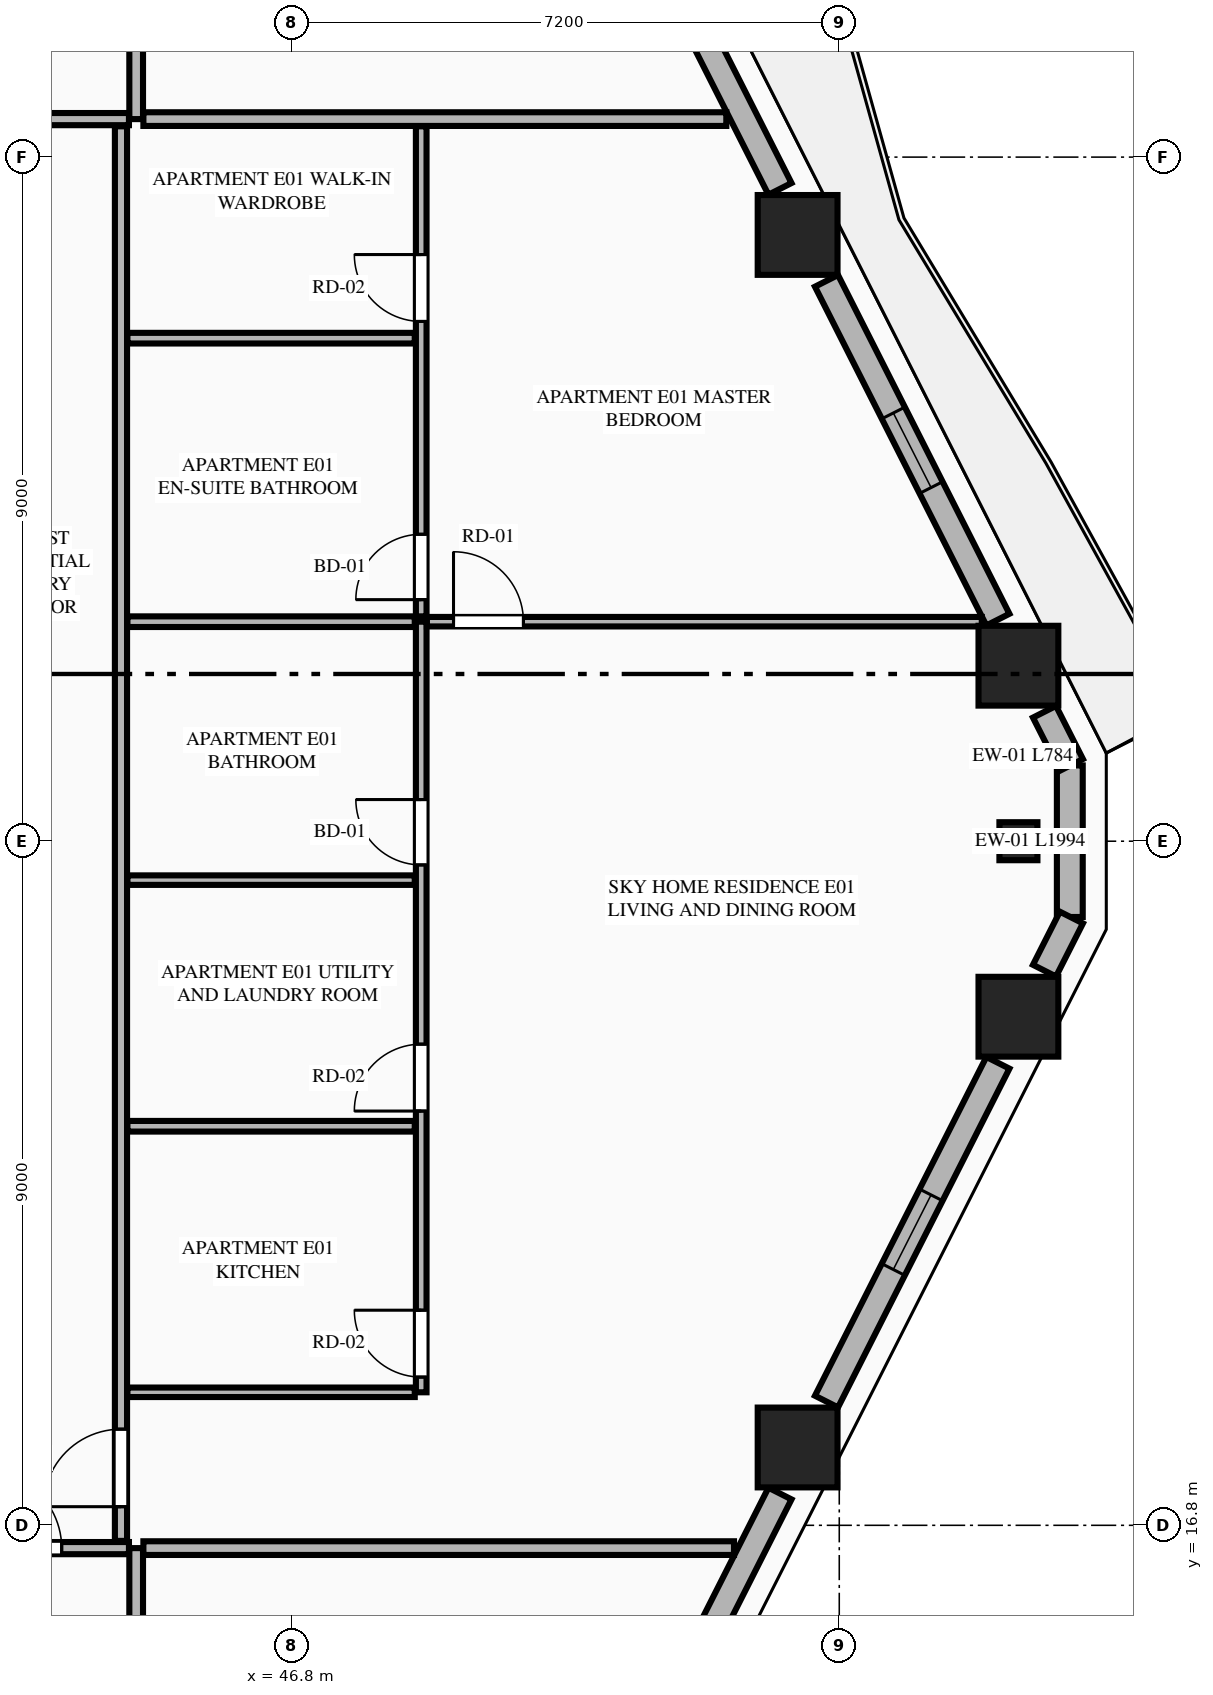
"""IFC4 building model, lengths in metres.
Left out: names, types, materials, properties, quantities, classifications, styles, units other than length and angle.
Written with IfcOpenShell. Run it as: python <this file> out.ifc"""

import sys

from ifc_helpers import new_model, si_unit, direction, frame, frame_2d, origin, origin_2d, place, context, subcontext, project, spatial, rectangle, extrude, element, fill, save


model = new_model("IFC4")
c1 = context("Model", 3, precision=1e-05, world=origin(), true_north=direction((0.0, 1.0)))
c2 = subcontext(c1, "Body", "Model", "MODEL_VIEW")
j1 = project(units=[si_unit("LENGTHUNIT", "METRE"), si_unit("PLANEANGLEUNIT", "RADIAN")], contexts=[c1])
p1 = place(None, origin())
s1 = spatial("IfcSite", under=j1, at=p1, CompositionType="ELEMENT")
p2 = place(p1, origin())
s2 = spatial("IfcBuilding", under=s1, at=p2, CompositionType="ELEMENT")
p3 = place(p2, frame((0.0, 0.0, 130.35)))
s3 = spatial("IfcBuildingStorey", under=s2, at=p3, CompositionType="ELEMENT", Elevation=130.35)
for number, where, z_axis, x_axis in (
    (1, (53.452, 17.824, 0.0), (0.0, 0.0, 1.0), (1.0, 0.0, 0.0)),
    (2, (56.357, 23.491, 0.0), (0.0, 0.0, 1.0), (1.0, 0.0, 0.0)),
    (3, (56.357, 28.109, 0.0), (0.0, 0.0, 1.0), (1.0, 0.0, 0.0)),
    (4, (53.452, 33.776, 0.0), (0.0, 0.0, 1.0), (1.0, 0.0, 0.0)),
):
    element("IfcColumn", number, at=place(p3, frame(where, z_axis=z_axis, x_axis=x_axis)), inside=s3, PredefinedType="COLUMN", context=c2, shape_type="SweptSolid", body=[
        extrude(rectangle(XDim=1.05, YDim=1.05, at=origin_2d()), origin(), (0.0, 0.0, 1.0), 3.55),
    ])
p4 = place(p3, frame((56.357, 25.8, 0.0), z_axis=(0.0, 0.0, 1.0), x_axis=(0.0, 1.0, 0.0)))
e5 = element("IfcColumn", 5, at=p4, inside=s3, PredefinedType="PILASTER", context=c2, shape_type="SweptSolid", body=[
    extrude(rectangle(XDim=0.5, YDim=0.35, at=origin_2d()), origin(), (0.0, 0.0, 1.0), 3.55),
])
p5 = place(p3, frame((57.033, 24.803, 0.0), z_axis=(0.0, 0.0, 1.0), x_axis=(0.0, 1.0, 0.0)))
e6 = element("IfcWall", 6, at=p5, inside=s3, PredefinedType="STANDARD", context=c2, shape_type="SweptSolid", body=[
    extrude(rectangle(XDim=1.994, YDim=0.34, at=frame_2d((0.997, 0.0))), origin(), (0.0, 0.0, 1.0), 3.34),
])
p6 = place(p3, frame((50.863, 12.561, 0.0), z_axis=(0.0, 0.0, 1.0), x_axis=(0.451567731634, 0.892236842855, 0.0)))
e7 = element("IfcWall", 7, at=p6, inside=s3, PredefinedType="STANDARD", context=c2, shape_type="SweptSolid", body=[
    extrude(rectangle(XDim=5.219, YDim=0.34, at=frame_2d((2.61, 0.0))), origin(), (0.0, 0.0, 1.0), 2.797),
])
p7 = place(p6, frame((2.06, 0.0, 0.75)))
e8 = element("IfcOpeningElement", 8, at=p7, cuts=e7, PredefinedType="OPENING", context=c2, shape_type="SweptSolid", body=[
    extrude(rectangle(XDim=1.1, YDim=1.897, at=frame_2d((0.55, 0.948))), frame((0.0, 0.18, 0.0), z_axis=(0.0, -1.0, 0.0), x_axis=(1.0, 0.0, 0.0)), (0.0, 0.0, 1.0), 0.36),
])
p8 = place(p3, frame((53.832, 18.428, 0.0), z_axis=(0.0, 0.0, 1.0), x_axis=(0.451431617681, 0.892305718102, 0.0)))
e9 = element("IfcWall", 9, at=p8, inside=s3, PredefinedType="STANDARD", context=c2, shape_type="SweptSolid", body=[
    extrude(rectangle(XDim=4.995, YDim=0.34, at=frame_2d((2.498, 0.0))), origin(), (0.0, 0.0, 1.0), 2.797),
])
p9 = place(p8, frame((1.947, 0.0, 0.75)))
e10 = element("IfcOpeningElement", 10, at=p9, cuts=e9, PredefinedType="OPENING", context=c2, shape_type="SweptSolid", body=[
    extrude(rectangle(XDim=1.1, YDim=1.897, at=frame_2d((0.55, 0.948))), frame((0.0, 0.18, 0.0), z_axis=(0.0, -1.0, 0.0), x_axis=(1.0, 0.0, 0.0)), (0.0, 0.0, 1.0), 0.36),
])
for number, where, z_axis, x_axis in (
    (11, (56.7, 24.097, 0.0), (0.0, 0.0, 1.0), (0.452, 0.892, 0.0)),
    (12, (57.054, 26.804, 0.0), (0.0, 0.0, 1.0), (-0.452, 0.892, 0.0)),
):
    element("IfcWall", number, at=place(p3, frame(where, z_axis=z_axis, x_axis=x_axis)), inside=s3, PredefinedType="STANDARD", context=c2, shape_type="SweptSolid", body=[
        extrude(rectangle(XDim=0.783, YDim=0.34, at=frame_2d((0.392, 0.0))), origin(), (0.0, 0.0, 1.0), 3.34),
    ])
p10 = place(p3, frame((56.087, 28.715, 0.0), z_axis=(0.0, 0.0, 1.0), x_axis=(-0.451431617681, 0.892305718102, 0.0)))
e13 = element("IfcWall", 13, at=p10, inside=s3, PredefinedType="STANDARD", context=c2, shape_type="SweptSolid", body=[
    extrude(rectangle(XDim=4.995, YDim=0.34, at=frame_2d((2.498, 0.0))), origin(), (0.0, 0.0, 1.0), 2.797),
])
p11 = place(p10, frame((1.947, 0.0, 0.75)))
e14 = element("IfcOpeningElement", 14, at=p11, cuts=e13, PredefinedType="OPENING", context=c2, shape_type="SweptSolid", body=[
    extrude(rectangle(XDim=1.1, YDim=1.897, at=frame_2d((0.55, 0.948))), frame((0.0, 0.18, 0.0), z_axis=(0.0, -1.0, 0.0), x_axis=(1.0, 0.0, 0.0)), (0.0, 0.0, 1.0), 0.36),
])
p12 = place(p3, frame((53.22, 34.382, 0.0), z_axis=(0.0, 0.0, 1.0), x_axis=(-0.451567731634, 0.892236842855, 0.0)))
e15 = element("IfcWall", 15, at=p12, inside=s3, PredefinedType="STANDARD", context=c2, shape_type="SweptSolid", body=[
    extrude(rectangle(XDim=5.219, YDim=0.34, at=frame_2d((2.61, 0.0))), origin(), (0.0, 0.0, 1.0), 2.797),
])
p13 = place(p12, frame((2.699, 0.0, 0.0)))
e16 = element("IfcOpeningElement", 16, at=p13, cuts=e15, PredefinedType="OPENING", context=c2, shape_type="SweptSolid", body=[
    extrude(rectangle(XDim=1.1, YDim=2.25, at=frame_2d((0.55, 1.125))), frame((0.0, 0.18, 0.0), z_axis=(0.0, -1.0, 0.0), x_axis=(1.0, 0.0, 0.0)), (0.0, 0.0, 1.0), 0.36),
])
p14 = place(p3, frame((44.75, 4.105, 0.0), z_axis=(0.0, 0.0, 1.0), x_axis=(0.0, 1.0, 0.0)))
e17 = element("IfcWall", 17, at=p14, inside=s3, PredefinedType="PARTITIONING", context=c2, shape_type="SweptSolid", body=[
    extrude(rectangle(XDim=12.395, YDim=0.18, at=frame_2d((6.198, 0.0))), origin(), (0.0, 0.0, 1.0), 3.34),
])
p15 = place(p3, frame((28.663, 16.5, 0.0), z_axis=(0.0, 0.0, 1.0), x_axis=(1.0, 0.0, 0.0)))
e18 = element("IfcWall", 18, at=p15, inside=s3, PredefinedType="PARTITIONING", context=c2, shape_type="SweptSolid", body=[
    extrude(rectangle(XDim=15.992, YDim=0.16, at=frame_2d((7.996, 0.0))), origin(), (0.0, 0.0, 1.0), 3.34),
])
p16 = place(p15, frame((14.087, 0.0, 0.0)))
e19 = element("IfcOpeningElement", 19, at=p16, cuts=e18, PredefinedType="OPENING", context=c2, shape_type="SweptSolid", body=[
    extrude(rectangle(XDim=1.02, YDim=2.25, at=frame_2d((0.51, 1.125))), frame((0.0, 0.09, 0.0), z_axis=(0.0, -1.0, 0.0), x_axis=(1.0, 0.0, 0.0)), (0.0, 0.0, 1.0), 0.18),
])
p17 = place(p3, frame((44.75, 35.3, 0.0), z_axis=(0.0, 0.0, 1.0), x_axis=(0.0, 1.0, 0.0)))
e20 = element("IfcWall", 20, at=p17, inside=s3, PredefinedType="PARTITIONING", context=c2, shape_type="SweptSolid", body=[
    extrude(rectangle(XDim=12.195, YDim=0.18, at=frame_2d((6.098, 0.0))), origin(), (0.0, 0.0, 1.0), 3.34),
])
p18 = place(p3, frame((20.145, 35.3, 0.0), z_axis=(0.0, 0.0, 1.0), x_axis=(1.0, 0.0, 0.0)))
e21 = element("IfcWall", 21, at=p18, inside=s3, PredefinedType="PARTITIONING", context=c2, shape_type="SweptSolid", body=[
    extrude(rectangle(XDim=24.51, YDim=0.16, at=frame_2d((12.255, 0.0))), origin(), (0.0, 0.0, 1.0), 3.34),
])
p19 = place(p18, frame((0.405, 0.0, 0.0)))
e22 = element("IfcOpeningElement", 22, at=p19, cuts=e21, PredefinedType="OPENING", context=c2, shape_type="SweptSolid", body=[
    extrude(rectangle(XDim=1.35, YDim=2.35, at=frame_2d((0.675, 1.175))), frame((0.0, 0.09, 0.0), z_axis=(0.0, -1.0, 0.0), x_axis=(1.0, 0.0, 0.0)), (0.0, 0.0, 1.0), 0.18),
])
p20 = place(p3, frame((44.845, 16.5, 0.0), z_axis=(0.0, 0.0, 1.0), x_axis=(1.0, 0.0, 0.0)))
e23 = element("IfcWall", 23, at=p20, inside=s3, PredefinedType="PARTITIONING", context=c2, shape_type="SweptSolid", body=[
    extrude(rectangle(XDim=7.77, YDim=0.18, at=frame_2d((3.885, 0.0))), origin(), (0.0, 0.0, 1.0), 3.34),
])
p21 = place(p3, frame((44.845, 35.3, 0.0), z_axis=(0.0, 0.0, 1.0), x_axis=(1.0, 0.0, 0.0)))
e24 = element("IfcWall", 24, at=p21, inside=s3, PredefinedType="PARTITIONING", context=c2, shape_type="SweptSolid", body=[
    extrude(rectangle(XDim=7.669, YDim=0.18, at=frame_2d((3.834, 0.0))), origin(), (0.0, 0.0, 1.0), 3.34),
])
p22 = place(p3, frame((44.55, 16.595, 0.0), z_axis=(0.0, 0.0, 1.0), x_axis=(0.0, 1.0, 0.0)))
e25 = element("IfcWall", 25, at=p22, inside=s3, PredefinedType="PARTITIONING", context=c2, shape_type="SweptSolid", body=[
    extrude(rectangle(XDim=18.61, YDim=0.16, at=frame_2d((9.305, 0.0))), origin(), (0.0, 0.0, 1.0), 3.34),
])
p23 = place(p22, frame((0.45, 0.0, 0.0)))
e26 = element("IfcOpeningElement", 26, at=p23, cuts=e25, PredefinedType="OPENING", context=c2, shape_type="SweptSolid", body=[
    extrude(rectangle(XDim=1.02, YDim=2.25, at=frame_2d((0.51, 1.125))), frame((0.0, 0.09, 0.0), z_axis=(0.0, -1.0, 0.0), x_axis=(1.0, 0.0, 0.0)), (0.0, 0.0, 1.0), 0.18),
])
p24 = place(p3, frame((44.635, 18.55, 0.0), z_axis=(0.0, 0.0, 1.0), x_axis=(1.0, 0.0, 0.0)))
e27 = element("IfcWall", 27, at=p24, inside=s3, PredefinedType="PARTITIONING", context=c2, shape_type="SweptSolid", body=[
    extrude(rectangle(XDim=3.78, YDim=0.125, at=frame_2d((1.89, 0.0))), origin(), (0.0, 0.0, 1.0), 2.722),
])
p25 = place(p3, frame((48.5, 18.55, 0.0), z_axis=(0.0, 0.0, 1.0), x_axis=(0.0, 1.0, 0.0)))
e28 = element("IfcWall", 28, at=p25, inside=s3, PredefinedType="PLUMBINGWALL", context=c2, shape_type="SweptSolid", body=[
    extrude(rectangle(XDim=10.138, YDim=0.14, at=frame_2d((5.069, 0.0))), origin(), (0.0, 0.0, 1.0), 3.34),
])
p26 = place(p25, frame((0.2, 0.0, 0.0)))
e29 = element("IfcOpeningElement", 29, at=p26, cuts=e28, PredefinedType="OPENING", context=c2, shape_type="SweptSolid", body=[
    extrude(rectangle(XDim=0.88, YDim=2.15, at=frame_2d((0.44, 1.075))), frame((0.0, 0.08, 0.0), z_axis=(0.0, -1.0, 0.0), x_axis=(1.0, 0.0, 0.0)), (0.0, 0.0, 1.0), 0.16),
])
p27 = place(p25, frame((3.7, 0.0, 0.0)))
e30 = element("IfcOpeningElement", 30, at=p27, cuts=e28, PredefinedType="OPENING", context=c2, shape_type="SweptSolid", body=[
    extrude(rectangle(XDim=0.88, YDim=2.15, at=frame_2d((0.44, 1.075))), frame((0.0, 0.08, 0.0), z_axis=(0.0, -1.0, 0.0), x_axis=(1.0, 0.0, 0.0)), (0.0, 0.0, 1.0), 0.16),
])
p28 = place(p25, frame((6.938, 0.0, 0.0)))
e31 = element("IfcOpeningElement", 31, at=p28, cuts=e28, PredefinedType="OPENING", context=c2, shape_type="SweptSolid", body=[
    extrude(rectangle(XDim=0.86, YDim=2.1, at=frame_2d((0.43, 1.05))), frame((0.0, 0.08, 0.0), z_axis=(0.0, -1.0, 0.0), x_axis=(1.0, 0.0, 0.0)), (0.0, 0.0, 1.0), 0.16),
])
p29 = place(p3, frame((48.5, 28.758, 0.0), z_axis=(0.0, 0.0, 1.0), x_axis=(0.0, 1.0, 0.0)))
e32 = element("IfcWall", 32, at=p29, inside=s3, PredefinedType="PLUMBINGWALL", context=c2, shape_type="SweptSolid", body=[
    extrude(rectangle(XDim=6.447, YDim=0.14, at=frame_2d((3.224, 0.0))), origin(), (0.0, 0.0, 1.0), 3.34),
])
p30 = place(p29, frame((0.22, 0.0, 0.0)))
e33 = element("IfcOpeningElement", 33, at=p30, cuts=e32, PredefinedType="OPENING", context=c2, shape_type="SweptSolid", body=[
    extrude(rectangle(XDim=0.86, YDim=2.1, at=frame_2d((0.43, 1.05))), frame((0.0, 0.08, 0.0), z_axis=(0.0, -1.0, 0.0), x_axis=(1.0, 0.0, 0.0)), (0.0, 0.0, 1.0), 0.16),
])
p31 = place(p29, frame((3.88, 0.0, 0.0)))
e34 = element("IfcOpeningElement", 34, at=p31, cuts=e32, PredefinedType="OPENING", context=c2, shape_type="SweptSolid", body=[
    extrude(rectangle(XDim=0.88, YDim=2.15, at=frame_2d((0.44, 1.075))), frame((0.0, 0.08, 0.0), z_axis=(0.0, -1.0, 0.0), x_axis=(1.0, 0.0, 0.0)), (0.0, 0.0, 1.0), 0.16),
])
p32 = place(p3, frame((44.635, 28.688, 0.0), z_axis=(0.0, 0.0, 1.0), x_axis=(1.0, 0.0, 0.0)))
e35 = element("IfcWall", 35, at=p32, inside=s3, PredefinedType="PLUMBINGWALL", context=c2, shape_type="SweptSolid", body=[
    extrude(rectangle(XDim=3.78, YDim=0.14, at=frame_2d((1.89, 0.0))), origin(), (0.0, 0.0, 1.0), 3.34),
])
p33 = place(p3, frame((48.575, 28.688, 0.0), z_axis=(0.0, 0.0, 1.0), x_axis=(1.0, 0.0, 0.0)))
e36 = element("IfcWall", 36, at=p33, inside=s3, PredefinedType="PARTITIONING", context=c2, shape_type="SweptSolid", body=[
    extrude(rectangle(XDim=7.3, YDim=0.125, at=frame_2d((3.65, 0.0))), origin(), (0.0, 0.0, 1.0), 3.34),
])
p34 = place(p33, frame((0.35, 0.0, 0.0)))
e37 = element("IfcOpeningElement", 37, at=p34, cuts=e36, PredefinedType="OPENING", context=c2, shape_type="SweptSolid", body=[
    extrude(rectangle(XDim=0.92, YDim=2.15, at=frame_2d((0.46, 1.075))), frame((0.0, 0.073, 0.0), z_axis=(0.0, -1.0, 0.0), x_axis=(1.0, 0.0, 0.0)), (0.0, 0.0, 1.0), 0.145),
])
p35 = place(p3, frame((44.635, 22.05, 0.0), z_axis=(0.0, 0.0, 1.0), x_axis=(1.0, 0.0, 0.0)))
e38 = element("IfcWall", 38, at=p35, inside=s3, PredefinedType="PLUMBINGWALL", context=c2, shape_type="SweptSolid", body=[
    extrude(rectangle(XDim=3.78, YDim=0.14, at=frame_2d((1.89, 0.0))), origin(), (0.0, 0.0, 1.0), 3.34),
])
p36 = place(p3, frame((44.635, 25.288, 0.0), z_axis=(0.0, 0.0, 1.0), x_axis=(1.0, 0.0, 0.0)))
e39 = element("IfcWall", 39, at=p36, inside=s3, PredefinedType="PARTITIONING", context=c2, shape_type="SweptSolid", body=[
    extrude(rectangle(XDim=3.78, YDim=0.125, at=frame_2d((1.89, 0.0))), origin(), (0.0, 0.0, 1.0), 3.34),
])
p37 = place(p3, frame((44.635, 32.418, 0.0), z_axis=(0.0, 0.0, 1.0), x_axis=(1.0, 0.0, 0.0)))
e40 = element("IfcWall", 40, at=p37, inside=s3, PredefinedType="PLUMBINGWALL", context=c2, shape_type="SweptSolid", body=[
    extrude(rectangle(XDim=3.78, YDim=0.14, at=frame_2d((1.89, 0.0))), origin(), (0.0, 0.0, 1.0), 3.34),
])
p38 = place(p9, origin())
e41 = element("IfcWindow", 41, at=p38, inside=s3, PartitioningType="SINGLE_PANEL", PredefinedType="WINDOW", context=c2, shape_type="SweptSolid", body=[
    extrude(rectangle(XDim=1.1, YDim=1.897, at=frame_2d((0.55, 0.948))), frame((0.0, 0.03, 0.0), z_axis=(0.0, -1.0, 0.0), x_axis=(1.0, 0.0, 0.0)), (0.0, 0.0, 1.0), 0.06),
])
fill(e10, e41)
p39 = place(p11, origin())
e42 = element("IfcWindow", 42, at=p39, inside=s3, PartitioningType="SINGLE_PANEL", PredefinedType="WINDOW", context=c2, shape_type="SweptSolid", body=[
    extrude(rectangle(XDim=1.1, YDim=1.897, at=frame_2d((0.55, 0.948))), frame((0.0, 0.03, 0.0), z_axis=(0.0, -1.0, 0.0), x_axis=(1.0, 0.0, 0.0)), (0.0, 0.0, 1.0), 0.06),
])
fill(e14, e42)
p40 = place(p16, origin())
e43 = element("IfcDoor", 43, at=p40, inside=s3, OperationType="SINGLE_SWING_LEFT", PredefinedType="DOOR", context=c2, shape_type="SweptSolid", body=[
    extrude(rectangle(XDim=1.02, YDim=2.25, at=frame_2d((0.51, 1.125))), frame((0.0, 0.025, 0.0), z_axis=(0.0, -1.0, 0.0), x_axis=(1.0, 0.0, 0.0)), (0.0, 0.0, 1.0), 0.05),
])
fill(e19, e43)
p41 = place(p26, origin())
e44 = element("IfcDoor", 44, at=p41, inside=s3, OperationType="SINGLE_SWING_RIGHT", PredefinedType="DOOR", context=c2, shape_type="SweptSolid", body=[
    extrude(rectangle(XDim=0.88, YDim=2.15, at=frame_2d((0.44, 1.075))), frame((0.0, 0.025, 0.0), z_axis=(0.0, -1.0, 0.0), x_axis=(1.0, 0.0, 0.0)), (0.0, 0.0, 1.0), 0.05),
])
fill(e29, e44)
p42 = place(p27, origin())
e45 = element("IfcDoor", 45, at=p42, inside=s3, OperationType="SINGLE_SWING_LEFT", PredefinedType="DOOR", context=c2, shape_type="SweptSolid", body=[
    extrude(rectangle(XDim=0.88, YDim=2.15, at=frame_2d((0.44, 1.075))), frame((0.0, 0.025, 0.0), z_axis=(0.0, -1.0, 0.0), x_axis=(1.0, 0.0, 0.0)), (0.0, 0.0, 1.0), 0.05),
])
fill(e30, e45)
p43 = place(p28, origin())
e46 = element("IfcDoor", 46, at=p43, inside=s3, OperationType="SINGLE_SWING_RIGHT", PredefinedType="DOOR", context=c2, shape_type="SweptSolid", body=[
    extrude(rectangle(XDim=0.86, YDim=2.1, at=frame_2d((0.43, 1.05))), frame((0.0, 0.025, 0.0), z_axis=(0.0, -1.0, 0.0), x_axis=(1.0, 0.0, 0.0)), (0.0, 0.0, 1.0), 0.05),
])
fill(e31, e46)
p44 = place(p30, origin())
e47 = element("IfcDoor", 47, at=p44, inside=s3, OperationType="SINGLE_SWING_LEFT", PredefinedType="DOOR", context=c2, shape_type="SweptSolid", body=[
    extrude(rectangle(XDim=0.86, YDim=2.1, at=frame_2d((0.43, 1.05))), frame((0.0, 0.025, 0.0), z_axis=(0.0, -1.0, 0.0), x_axis=(1.0, 0.0, 0.0)), (0.0, 0.0, 1.0), 0.05),
])
fill(e33, e47)
p45 = place(p31, origin())
e48 = element("IfcDoor", 48, at=p45, inside=s3, OperationType="SINGLE_SWING_RIGHT", PredefinedType="DOOR", context=c2, shape_type="SweptSolid", body=[
    extrude(rectangle(XDim=0.88, YDim=2.15, at=frame_2d((0.44, 1.075))), frame((0.0, 0.025, 0.0), z_axis=(0.0, -1.0, 0.0), x_axis=(1.0, 0.0, 0.0)), (0.0, 0.0, 1.0), 0.05),
])
fill(e34, e48)
p46 = place(p23, origin())
e49 = element("IfcDoor", 49, at=p46, inside=s3, OperationType="SINGLE_SWING_LEFT", PredefinedType="DOOR", context=c2, shape_type="SweptSolid", body=[
    extrude(rectangle(XDim=1.02, YDim=2.25, at=frame_2d((0.51, 1.125))), frame((0.0, 0.025, 0.0), z_axis=(0.0, -1.0, 0.0), x_axis=(1.0, 0.0, 0.0)), (0.0, 0.0, 1.0), 0.05),
])
fill(e26, e49)
p47 = place(p34, origin())
e50 = element("IfcDoor", 50, at=p47, inside=s3, OperationType="SINGLE_SWING_LEFT", PredefinedType="DOOR", context=c2, shape_type="SweptSolid", body=[
    extrude(rectangle(XDim=0.92, YDim=2.15, at=frame_2d((0.46, 1.075))), frame((0.0, 0.025, 0.0), z_axis=(0.0, -1.0, 0.0), x_axis=(1.0, 0.0, 0.0)), (0.0, 0.0, 1.0), 0.05),
])
fill(e37, e50)
save(model, sys.argv[1])
